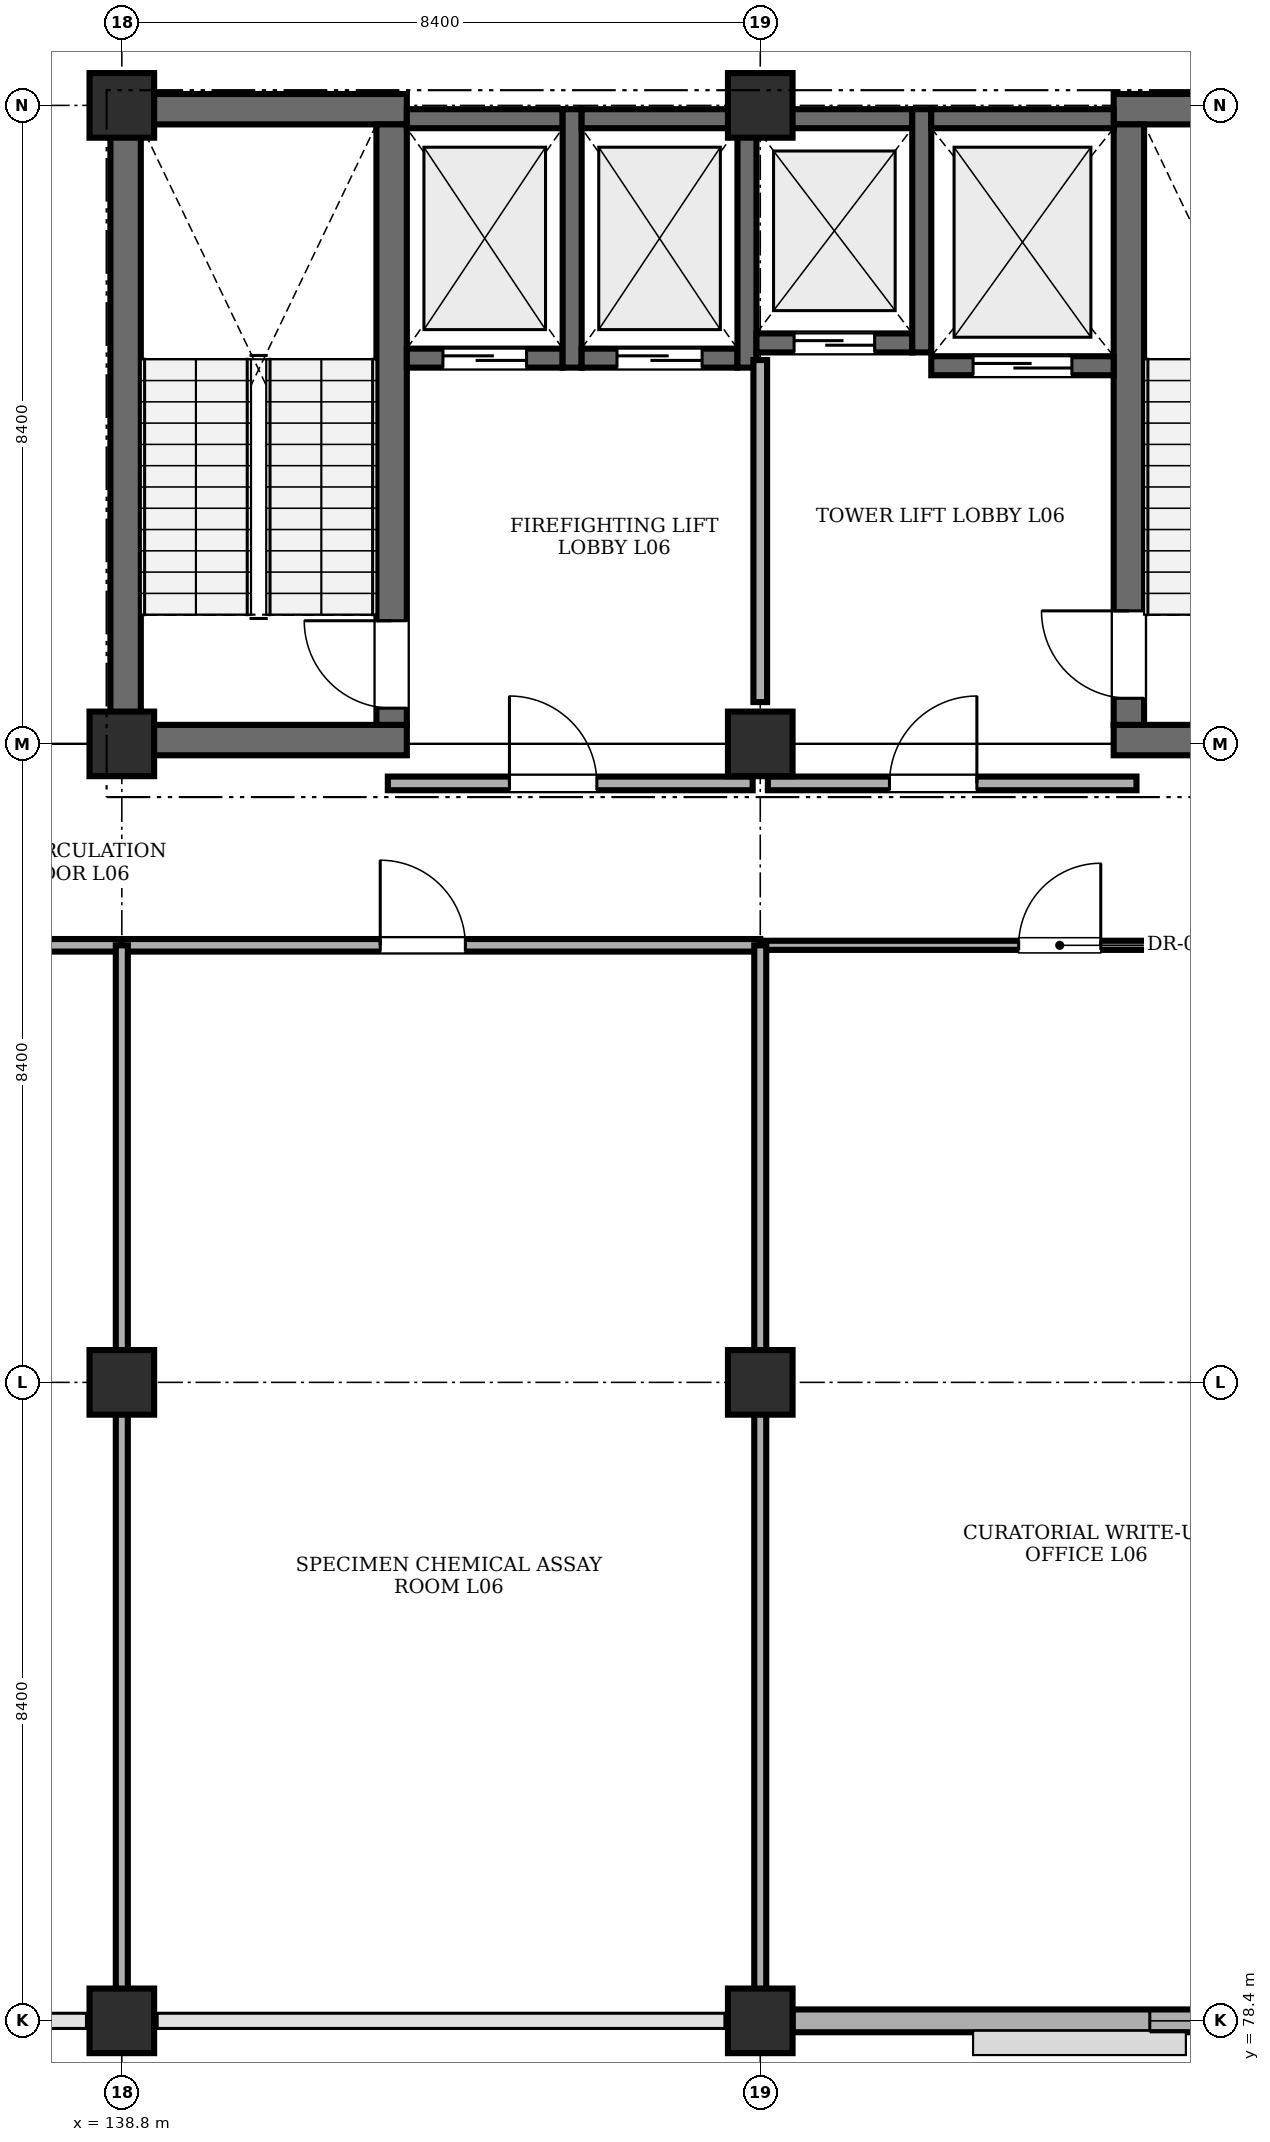
"""IFC4 building model, lengths in metres.
Left out: names, types, materials, properties, quantities, classifications, styles, units other than length and angle.
Written with IfcOpenShell. Run it as: python <this file> out.ifc"""

import sys

from ifc_helpers import new_model, si_unit, direction, frame, frame_2d, origin, origin_2d, place, context, subcontext, project, spatial, rectangle, extrude, element, fill, save


model = new_model("IFC4")
c1 = context("Model", 3, precision=1e-05, world=origin(), true_north=direction((0.0, 1.0)))
c2 = subcontext(c1, "Body", "Model", "MODEL_VIEW")
j1 = project(units=[si_unit("LENGTHUNIT", "METRE"), si_unit("PLANEANGLEUNIT", "RADIAN")], contexts=[c1])
p1 = place(None, origin())
s1 = spatial("IfcSite", under=j1, at=p1, CompositionType="ELEMENT")
p2 = place(p1, origin())
s2 = spatial("IfcBuilding", under=s1, at=p2, CompositionType="ELEMENT")
p3 = place(p2, frame((0.0, 0.0, 23.4)))
s3 = spatial("IfcBuildingStorey", under=s2, at=p3, CompositionType="ELEMENT", Elevation=23.4)
for number, where, z_axis, x_axis in (
    (1, (138.8, 78.4, 0.0), (0.0, 0.0, 1.0), (1.0, 0.0, 0.0)),
    (2, (138.8, 86.8, 0.0), (0.0, 0.0, 1.0), (1.0, 0.0, 0.0)),
    (3, (138.8, 95.2, 0.0), (0.0, 0.0, 1.0), (1.0, 0.0, 0.0)),
    (4, (138.8, 103.6, 0.0), (0.0, 0.0, 1.0), (1.0, 0.0, 0.0)),
    (5, (147.2, 78.4, 0.0), (0.0, 0.0, 1.0), (1.0, 0.0, 0.0)),
    (6, (147.2, 86.8, 0.0), (0.0, 0.0, 1.0), (1.0, 0.0, 0.0)),
    (7, (147.2, 95.2, 0.0), (0.0, 0.0, 1.0), (1.0, 0.0, 0.0)),
    (8, (147.2, 103.6, 0.0), (0.0, 0.0, 1.0), (1.0, 0.0, 0.0)),
):
    element("IfcColumn", number, at=place(p3, frame(where, z_axis=z_axis, x_axis=x_axis)), inside=s3, PredefinedType="COLUMN", context=c2, shape_type="SweptSolid", body=[
        extrude(rectangle(XDim=0.85, YDim=0.85, at=origin_2d()), origin(), (0.0, 0.0, 1.0), 4.0),
    ])
for number, where, z_axis, x_axis in (
    (9, (138.65, 95.25, 0.0), (0.0, 0.0, 1.0), (1.0, 0.0, 0.0)),
    (10, (138.65, 103.55, 0.0), (0.0, 0.0, 1.0), (1.0, 0.0, 0.0)),
):
    element("IfcWall", number, at=place(p3, frame(where, z_axis=z_axis, x_axis=x_axis)), inside=s3, PredefinedType="SHEAR", context=c2, shape_type="SweptSolid", body=[
        extrude(rectangle(XDim=3.9, YDim=0.4, at=frame_2d((1.95, 0.0))), origin(), (0.0, 0.0, 1.0), 4.0),
    ])
p4 = place(p3, frame((138.85, 95.45, 0.0), z_axis=(0.0, 0.0, 1.0), x_axis=(0.0, 1.0, 0.0)))
e11 = element("IfcWall", 11, at=p4, inside=s3, PredefinedType="SHEAR", context=c2, shape_type="SweptSolid", body=[
    extrude(rectangle(XDim=7.9, YDim=0.4, at=frame_2d((3.95, 0.0))), origin(), (0.0, 0.0, 1.0), 4.0),
])
p5 = place(p3, frame((142.35, 95.45, 0.0), z_axis=(0.0, 0.0, 1.0), x_axis=(0.0, 1.0, 0.0)))
e12 = element("IfcWall", 12, at=p5, inside=s3, PredefinedType="SHEAR", context=c2, shape_type="SweptSolid", body=[
    extrude(rectangle(XDim=7.9, YDim=0.4, at=frame_2d((3.95, 0.0))), origin(), (0.0, 0.0, 1.0), 4.0),
])
p6 = place(p5, frame((0.22, 0.0, 0.0)))
e13 = element("IfcOpeningElement", 13, at=p6, cuts=e12, PredefinedType="OPENING", context=c2, shape_type="SweptSolid", body=[
    extrude(rectangle(XDim=1.15, YDim=2.15, at=frame_2d((0.575, 1.075))), frame((0.0, 0.21, 0.0), z_axis=(0.0, -1.0, 0.0), x_axis=(1.0, 0.0, 0.0)), (0.0, 0.0, 1.0), 0.42),
])
for number, where, z_axis, x_axis in (
    (14, (151.85, 95.25, 0.0), (0.0, 0.0, 1.0), (1.0, 0.0, 0.0)),
    (15, (151.85, 103.55, 0.0), (0.0, 0.0, 1.0), (1.0, 0.0, 0.0)),
):
    element("IfcWall", number, at=place(p3, frame(where, z_axis=z_axis, x_axis=x_axis)), inside=s3, PredefinedType="SHEAR", context=c2, shape_type="SweptSolid", body=[
        extrude(rectangle(XDim=3.9, YDim=0.4, at=frame_2d((1.95, 0.0))), origin(), (0.0, 0.0, 1.0), 4.0),
    ])
p7 = place(p3, frame((152.05, 95.45, 0.0), z_axis=(0.0, 0.0, 1.0), x_axis=(0.0, 1.0, 0.0)))
e16 = element("IfcWall", 16, at=p7, inside=s3, PredefinedType="SHEAR", context=c2, shape_type="SweptSolid", body=[
    extrude(rectangle(XDim=7.9, YDim=0.4, at=frame_2d((3.95, 0.0))), origin(), (0.0, 0.0, 1.0), 4.0),
])
p8 = place(p7, frame((0.35, 0.0, 0.0)))
e17 = element("IfcOpeningElement", 17, at=p8, cuts=e16, PredefinedType="OPENING", context=c2, shape_type="SweptSolid", body=[
    extrude(rectangle(XDim=1.15, YDim=2.15, at=frame_2d((0.575, 1.075))), frame((0.0, 0.21, 0.0), z_axis=(0.0, -1.0, 0.0), x_axis=(1.0, 0.0, 0.0)), (0.0, 0.0, 1.0), 0.42),
])
p9 = place(p3, frame((142.55, 100.275, 0.0), z_axis=(0.0, 0.0, 1.0), x_axis=(1.0, 0.0, 0.0)))
e18 = element("IfcWall", 18, at=p9, inside=s3, PredefinedType="SHEAR", context=c2, shape_type="SweptSolid", body=[
    extrude(rectangle(XDim=2.05, YDim=0.25, at=frame_2d((1.025, 0.0))), origin(), (0.0, 0.0, 1.0), 4.0),
])
p10 = place(p9, frame((0.475, 0.0, 0.0)))
e19 = element("IfcOpeningElement", 19, at=p10, cuts=e18, PredefinedType="OPENING", context=c2, shape_type="SweptSolid", body=[
    extrude(rectangle(XDim=1.1, YDim=2.15, at=frame_2d((0.55, 1.075))), frame((0.0, 0.135, 0.0), z_axis=(0.0, -1.0, 0.0), x_axis=(1.0, 0.0, 0.0)), (0.0, 0.0, 1.0), 0.27),
])
p11 = place(p3, frame((142.55, 103.425, 0.0), z_axis=(0.0, 0.0, 1.0), x_axis=(1.0, 0.0, 0.0)))
e20 = element("IfcWall", 20, at=p11, inside=s3, PredefinedType="SHEAR", context=c2, shape_type="SweptSolid", body=[
    extrude(rectangle(XDim=2.05, YDim=0.25, at=frame_2d((1.025, 0.0))), origin(), (0.0, 0.0, 1.0), 4.0),
])
p12 = place(p3, frame((144.725, 100.15, 0.0), z_axis=(0.0, 0.0, 1.0), x_axis=(0.0, 1.0, 0.0)))
e21 = element("IfcWall", 21, at=p12, inside=s3, PredefinedType="SHEAR", context=c2, shape_type="SweptSolid", body=[
    extrude(rectangle(XDim=3.4, YDim=0.25, at=frame_2d((1.7, 0.0))), origin(), (0.0, 0.0, 1.0), 4.0),
])
p13 = place(p3, frame((144.85, 100.275, 0.0), z_axis=(0.0, 0.0, 1.0), x_axis=(1.0, 0.0, 0.0)))
e22 = element("IfcWall", 22, at=p13, inside=s3, PredefinedType="SHEAR", context=c2, shape_type="SweptSolid", body=[
    extrude(rectangle(XDim=2.05, YDim=0.25, at=frame_2d((1.025, 0.0))), origin(), (0.0, 0.0, 1.0), 4.0),
])
p14 = place(p13, frame((0.465, 0.0, 0.0)))
e23 = element("IfcOpeningElement", 23, at=p14, cuts=e22, PredefinedType="OPENING", context=c2, shape_type="SweptSolid", body=[
    extrude(rectangle(XDim=1.12, YDim=2.15, at=frame_2d((0.56, 1.075))), frame((0.0, 0.135, 0.0), z_axis=(0.0, -1.0, 0.0), x_axis=(1.0, 0.0, 0.0)), (0.0, 0.0, 1.0), 0.27),
])
p15 = place(p3, frame((144.85, 103.425, 0.0), z_axis=(0.0, 0.0, 1.0), x_axis=(1.0, 0.0, 0.0)))
e24 = element("IfcWall", 24, at=p15, inside=s3, PredefinedType="SHEAR", context=c2, shape_type="SweptSolid", body=[
    extrude(rectangle(XDim=2.05, YDim=0.25, at=frame_2d((1.025, 0.0))), origin(), (0.0, 0.0, 1.0), 4.0),
])
p16 = place(p3, frame((147.025, 100.15, 0.0), z_axis=(0.0, 0.0, 1.0), x_axis=(0.0, 1.0, 0.0)))
e25 = element("IfcWall", 25, at=p16, inside=s3, PredefinedType="SHEAR", context=c2, shape_type="SweptSolid", body=[
    extrude(rectangle(XDim=3.4, YDim=0.25, at=frame_2d((1.7, 0.0))), origin(), (0.0, 0.0, 1.0), 4.0),
])
p17 = place(p3, frame((147.15, 100.475, 0.0), z_axis=(0.0, 0.0, 1.0), x_axis=(1.0, 0.0, 0.0)))
e26 = element("IfcWall", 26, at=p17, inside=s3, PredefinedType="SHEAR", context=c2, shape_type="SweptSolid", body=[
    extrude(rectangle(XDim=2.05, YDim=0.25, at=frame_2d((1.025, 0.0))), origin(), (0.0, 0.0, 1.0), 4.0),
])
p18 = place(p17, frame((0.495, 0.0, 0.0)))
e27 = element("IfcOpeningElement", 27, at=p18, cuts=e26, PredefinedType="OPENING", context=c2, shape_type="SweptSolid", body=[
    extrude(rectangle(XDim=1.06, YDim=2.15, at=frame_2d((0.53, 1.075))), frame((0.0, 0.135, 0.0), z_axis=(0.0, -1.0, 0.0), x_axis=(1.0, 0.0, 0.0)), (0.0, 0.0, 1.0), 0.27),
])
p19 = place(p3, frame((147.15, 103.425, 0.0), z_axis=(0.0, 0.0, 1.0), x_axis=(1.0, 0.0, 0.0)))
e28 = element("IfcWall", 28, at=p19, inside=s3, PredefinedType="SHEAR", context=c2, shape_type="SweptSolid", body=[
    extrude(rectangle(XDim=2.05, YDim=0.25, at=frame_2d((1.025, 0.0))), origin(), (0.0, 0.0, 1.0), 4.0),
])
p20 = place(p3, frame((149.325, 100.35, 0.0), z_axis=(0.0, 0.0, 1.0), x_axis=(0.0, 1.0, 0.0)))
e29 = element("IfcWall", 29, at=p20, inside=s3, PredefinedType="SHEAR", context=c2, shape_type="SweptSolid", body=[
    extrude(rectangle(XDim=3.2, YDim=0.25, at=frame_2d((1.6, 0.0))), origin(), (0.0, 0.0, 1.0), 4.0),
])
p21 = place(p3, frame((149.45, 100.175, 0.0), z_axis=(0.0, 0.0, 1.0), x_axis=(1.0, 0.0, 0.0)))
e30 = element("IfcWall", 30, at=p21, inside=s3, PredefinedType="SHEAR", context=c2, shape_type="SweptSolid", body=[
    extrude(rectangle(XDim=2.4, YDim=0.25, at=frame_2d((1.2, 0.0))), origin(), (0.0, 0.0, 1.0), 4.0),
])
p22 = place(p21, frame((0.55, 0.0, 0.0)))
e31 = element("IfcOpeningElement", 31, at=p22, cuts=e30, PredefinedType="OPENING", context=c2, shape_type="SweptSolid", body=[
    extrude(rectangle(XDim=1.3, YDim=2.25, at=frame_2d((0.65, 1.125))), frame((0.0, 0.135, 0.0), z_axis=(0.0, -1.0, 0.0), x_axis=(1.0, 0.0, 0.0)), (0.0, 0.0, 1.0), 0.27),
])
p23 = place(p3, frame((149.45, 103.425, 0.0), z_axis=(0.0, 0.0, 1.0), x_axis=(1.0, 0.0, 0.0)))
e32 = element("IfcWall", 32, at=p23, inside=s3, PredefinedType="SHEAR", context=c2, shape_type="SweptSolid", body=[
    extrude(rectangle(XDim=2.4, YDim=0.25, at=frame_2d((1.2, 0.0))), origin(), (0.0, 0.0, 1.0), 4.0),
])
p24 = place(p3, frame((155.175, 78.4, 0.0), z_axis=(0.0, 0.0, 1.0), x_axis=(-1.0, 0.0, 0.0)))
e33 = element("IfcWall", 33, at=p24, inside=s3, PredefinedType="STANDARD", context=c2, shape_type="SweptSolid", body=[
    extrude(rectangle(XDim=7.55, YDim=0.3, at=frame_2d((3.775, 0.0))), origin(), (0.0, 0.0, 1.0), 3.3),
])
p25 = place(p24, frame((1.15, 0.0, 0.95)))
e34 = element("IfcOpeningElement", 34, at=p25, cuts=e33, PredefinedType="OPENING", context=c2, shape_type="SweptSolid", body=[
    extrude(rectangle(XDim=1.7, YDim=2.05, at=frame_2d((0.85, 1.025))), frame((0.0, 0.16, 0.0), z_axis=(0.0, -1.0, 0.0), x_axis=(1.0, 0.0, 0.0)), (0.0, 0.0, 1.0), 0.32),
])
p26 = place(p3, frame((142.3, 94.68, 0.0), z_axis=(0.0, 0.0, 1.0), x_axis=(1.0, 0.0, 0.0)))
e35 = element("IfcWall", 35, at=p26, inside=s3, PredefinedType="STANDARD", context=c2, shape_type="SweptSolid", body=[
    extrude(rectangle(XDim=4.8, YDim=0.18, at=frame_2d((2.4, 0.0))), origin(), (0.0, 0.0, 1.0), 4.0),
])
p27 = place(p26, frame((1.6, 0.0, 0.0)))
e36 = element("IfcOpeningElement", 36, at=p27, cuts=e35, PredefinedType="OPENING", context=c2, shape_type="SweptSolid", body=[
    extrude(rectangle(XDim=1.15, YDim=2.15, at=frame_2d((0.575, 1.075))), frame((0.0, 0.1, 0.0), z_axis=(0.0, -1.0, 0.0), x_axis=(1.0, 0.0, 0.0)), (0.0, 0.0, 1.0), 0.2),
])
p28 = place(p3, frame((147.3, 94.68, 0.0), z_axis=(0.0, 0.0, 1.0), x_axis=(1.0, 0.0, 0.0)))
e37 = element("IfcWall", 37, at=p28, inside=s3, PredefinedType="STANDARD", context=c2, shape_type="SweptSolid", body=[
    extrude(rectangle(XDim=4.85, YDim=0.18, at=frame_2d((2.425, 0.0))), origin(), (0.0, 0.0, 1.0), 4.0),
])
p29 = place(p28, frame((1.6, 0.0, 0.0)))
e38 = element("IfcOpeningElement", 38, at=p29, cuts=e37, PredefinedType="OPENING", context=c2, shape_type="SweptSolid", body=[
    extrude(rectangle(XDim=1.15, YDim=2.15, at=frame_2d((0.575, 1.075))), frame((0.0, 0.1, 0.0), z_axis=(0.0, -1.0, 0.0), x_axis=(1.0, 0.0, 0.0)), (0.0, 0.0, 1.0), 0.2),
])
p30 = place(p3, frame((147.2, 95.75, 0.0), z_axis=(0.0, 0.0, 1.0), x_axis=(0.0, 1.0, 0.0)))
e39 = element("IfcWall", 39, at=p30, inside=s3, PredefinedType="STANDARD", context=c2, shape_type="SweptSolid", body=[
    extrude(rectangle(XDim=4.5, YDim=0.18, at=frame_2d((2.25, 0.0))), origin(), (0.0, 0.0, 1.0), 3.3),
])
p31 = place(p3, frame((122.15, 92.55, 0.0), z_axis=(0.0, 0.0, 1.0), x_axis=(1.0, 0.0, 0.0)))
e40 = element("IfcWall", 40, at=p31, inside=s3, PredefinedType="PARTITIONING", context=c2, shape_type="SweptSolid", body=[
    extrude(rectangle(XDim=16.65, YDim=0.165, at=frame_2d((8.325, 0.0))), origin(), (0.0, 0.0, 1.0), 4.0),
])
p32 = place(p31, frame((3.75, 0.0, 0.0)))
e41 = element("IfcOpeningElement", 41, at=p32, cuts=e40, PredefinedType="OPENING", context=c2, shape_type="SweptSolid", body=[
    extrude(rectangle(XDim=1.46, YDim=2.22, at=frame_2d((0.73, 1.11))), frame((0.0, 0.093, 0.0), z_axis=(0.0, -1.0, 0.0), x_axis=(1.0, 0.0, 0.0)), (0.0, 0.0, 1.0), 0.185),
])
p33 = place(p3, frame((138.8, 92.55, 0.0), z_axis=(0.0, 0.0, 1.0), x_axis=(1.0, 0.0, 0.0)))
e42 = element("IfcWall", 42, at=p33, inside=s3, PredefinedType="PARTITIONING", context=c2, shape_type="SweptSolid", body=[
    extrude(rectangle(XDim=8.4, YDim=0.165, at=frame_2d((4.2, 0.0))), origin(), (0.0, 0.0, 1.0), 4.0),
])
p34 = place(p33, frame((3.4, 0.0, 0.0)))
e43 = element("IfcOpeningElement", 43, at=p34, cuts=e42, PredefinedType="OPENING", context=c2, shape_type="SweptSolid", body=[
    extrude(rectangle(XDim=1.12, YDim=2.18, at=frame_2d((0.56, 1.09))), frame((0.0, 0.093, 0.0), z_axis=(0.0, -1.0, 0.0), x_axis=(1.0, 0.0, 0.0)), (0.0, 0.0, 1.0), 0.185),
])
p35 = place(p3, frame((138.8, 78.55, 0.0), z_axis=(0.0, 0.0, 1.0), x_axis=(0.0, 1.0, 0.0)))
e44 = element("IfcWall", 44, at=p35, inside=s3, PredefinedType="PARTITIONING", context=c2, shape_type="SweptSolid", body=[
    extrude(rectangle(XDim=14.0, YDim=0.158, at=frame_2d((7.0, 0.0))), origin(), (0.0, 0.0, 1.0), 3.3),
])
p36 = place(p3, frame((147.2, 92.55, 0.0), z_axis=(0.0, 0.0, 1.0), x_axis=(1.0, 0.0, 0.0)))
e45 = element("IfcWall", 45, at=p36, inside=s3, PredefinedType="PARTITIONING", context=c2, shape_type="SweptSolid", body=[
    extrude(rectangle(XDim=8.4, YDim=0.12, at=frame_2d((4.2, 0.0))), origin(), (0.0, 0.0, 1.0), 4.0),
])
p37 = place(p36, frame((3.4, 0.0, 0.0)))
e46 = element("IfcOpeningElement", 46, at=p37, cuts=e45, PredefinedType="OPENING", context=c2, shape_type="SweptSolid", body=[
    extrude(rectangle(XDim=1.08, YDim=2.15, at=frame_2d((0.54, 1.075))), frame((0.0, 0.07, 0.0), z_axis=(0.0, -1.0, 0.0), x_axis=(1.0, 0.0, 0.0)), (0.0, 0.0, 1.0), 0.14),
])
p38 = place(p3, frame((147.2, 78.55, 0.0), z_axis=(0.0, 0.0, 1.0), x_axis=(0.0, 1.0, 0.0)))
e47 = element("IfcWall", 47, at=p38, inside=s3, PredefinedType="PARTITIONING", context=c2, shape_type="SweptSolid", body=[
    extrude(rectangle(XDim=14.0, YDim=0.158, at=frame_2d((7.0, 0.0))), origin(), (0.0, 0.0, 1.0), 3.3),
])
p39 = place(p25, origin())
e48 = element("IfcWindow", 48, at=p39, inside=s3, PartitioningType="DOUBLE_PANEL_VERTICAL", PredefinedType="WINDOW", context=c2, shape_type="SweptSolid", body=[
    extrude(rectangle(XDim=1.7, YDim=2.05, at=frame_2d((0.85, 1.025))), frame((0.0, 0.03, 0.0), z_axis=(0.0, -1.0, 0.0), x_axis=(1.0, 0.0, 0.0)), (0.0, 0.0, 1.0), 0.06),
])
fill(e34, e48)
p40 = place(p27, origin())
e49 = element("IfcDoor", 49, at=p40, inside=s3, OperationType="SINGLE_SWING_LEFT", PredefinedType="DOOR", context=c2, shape_type="SweptSolid", body=[
    extrude(rectangle(XDim=1.15, YDim=2.15, at=frame_2d((0.575, 1.075))), frame((0.0, 0.025, 0.0), z_axis=(0.0, -1.0, 0.0), x_axis=(1.0, 0.0, 0.0)), (0.0, 0.0, 1.0), 0.05),
])
fill(e36, e49)
p41 = place(p29, origin())
e50 = element("IfcDoor", 50, at=p41, inside=s3, OperationType="SINGLE_SWING_RIGHT", PredefinedType="DOOR", context=c2, shape_type="SweptSolid", body=[
    extrude(rectangle(XDim=1.15, YDim=2.15, at=frame_2d((0.575, 1.075))), frame((0.0, 0.025, 0.0), z_axis=(0.0, -1.0, 0.0), x_axis=(1.0, 0.0, 0.0)), (0.0, 0.0, 1.0), 0.05),
])
fill(e38, e50)
p42 = place(p34, origin())
e51 = element("IfcDoor", 51, at=p42, inside=s3, OperationType="SINGLE_SWING_LEFT", PredefinedType="DOOR", context=c2, shape_type="SweptSolid", body=[
    extrude(rectangle(XDim=1.12, YDim=2.18, at=frame_2d((0.56, 1.09))), frame((0.0, 0.025, 0.0), z_axis=(0.0, -1.0, 0.0), x_axis=(1.0, 0.0, 0.0)), (0.0, 0.0, 1.0), 0.05),
])
fill(e43, e51)
p43 = place(p37, origin())
e52 = element("IfcDoor", 52, at=p43, inside=s3, OperationType="SINGLE_SWING_RIGHT", PredefinedType="DOOR", context=c2, shape_type="SweptSolid", body=[
    extrude(rectangle(XDim=1.08, YDim=2.15, at=frame_2d((0.54, 1.075))), frame((0.0, 0.025, 0.0), z_axis=(0.0, -1.0, 0.0), x_axis=(1.0, 0.0, 0.0)), (0.0, 0.0, 1.0), 0.05),
])
fill(e46, e52)
p44 = place(p6, origin())
e53 = element("IfcDoor", 53, at=p44, inside=s3, OperationType="SINGLE_SWING_RIGHT", PredefinedType="DOOR", context=c2, shape_type="SweptSolid", body=[
    extrude(rectangle(XDim=1.15, YDim=2.15, at=frame_2d((0.575, 1.075))), frame((0.0, 0.025, 0.0), z_axis=(0.0, -1.0, 0.0), x_axis=(1.0, 0.0, 0.0)), (0.0, 0.0, 1.0), 0.05),
])
fill(e13, e53)
p45 = place(p8, origin())
e54 = element("IfcDoor", 54, at=p45, inside=s3, OperationType="SINGLE_SWING_RIGHT", PredefinedType="DOOR", context=c2, shape_type="SweptSolid", body=[
    extrude(rectangle(XDim=1.15, YDim=2.15, at=frame_2d((0.575, 1.075))), frame((0.0, 0.025, 0.0), z_axis=(0.0, -1.0, 0.0), x_axis=(1.0, 0.0, 0.0)), (0.0, 0.0, 1.0), 0.05),
])
fill(e17, e54)
p46 = place(p10, origin())
e55 = element("IfcDoor", 55, at=p46, inside=s3, OperationType="SLIDING_TO_LEFT", PredefinedType="DOOR", context=c2, shape_type="SweptSolid", body=[
    extrude(rectangle(XDim=1.1, YDim=2.15, at=frame_2d((0.55, 1.075))), frame((0.0, 0.025, 0.0), z_axis=(0.0, -1.0, 0.0), x_axis=(1.0, 0.0, 0.0)), (0.0, 0.0, 1.0), 0.05),
])
fill(e19, e55)
p47 = place(p14, origin())
e56 = element("IfcDoor", 56, at=p47, inside=s3, OperationType="SLIDING_TO_LEFT", PredefinedType="DOOR", context=c2, shape_type="SweptSolid", body=[
    extrude(rectangle(XDim=1.12, YDim=2.15, at=frame_2d((0.56, 1.075))), frame((0.0, 0.025, 0.0), z_axis=(0.0, -1.0, 0.0), x_axis=(1.0, 0.0, 0.0)), (0.0, 0.0, 1.0), 0.05),
])
fill(e23, e56)
p48 = place(p18, origin())
e57 = element("IfcDoor", 57, at=p48, inside=s3, OperationType="SLIDING_TO_LEFT", PredefinedType="DOOR", context=c2, shape_type="SweptSolid", body=[
    extrude(rectangle(XDim=1.06, YDim=2.15, at=frame_2d((0.53, 1.075))), frame((0.0, 0.025, 0.0), z_axis=(0.0, -1.0, 0.0), x_axis=(1.0, 0.0, 0.0)), (0.0, 0.0, 1.0), 0.05),
])
fill(e27, e57)
p49 = place(p22, origin())
e58 = element("IfcDoor", 58, at=p49, inside=s3, OperationType="SLIDING_TO_LEFT", PredefinedType="DOOR", context=c2, shape_type="SweptSolid", body=[
    extrude(rectangle(XDim=1.3, YDim=2.25, at=frame_2d((0.65, 1.125))), frame((0.0, 0.025, 0.0), z_axis=(0.0, -1.0, 0.0), x_axis=(1.0, 0.0, 0.0)), (0.0, 0.0, 1.0), 0.05),
])
fill(e31, e58)
save(model, sys.argv[1])
